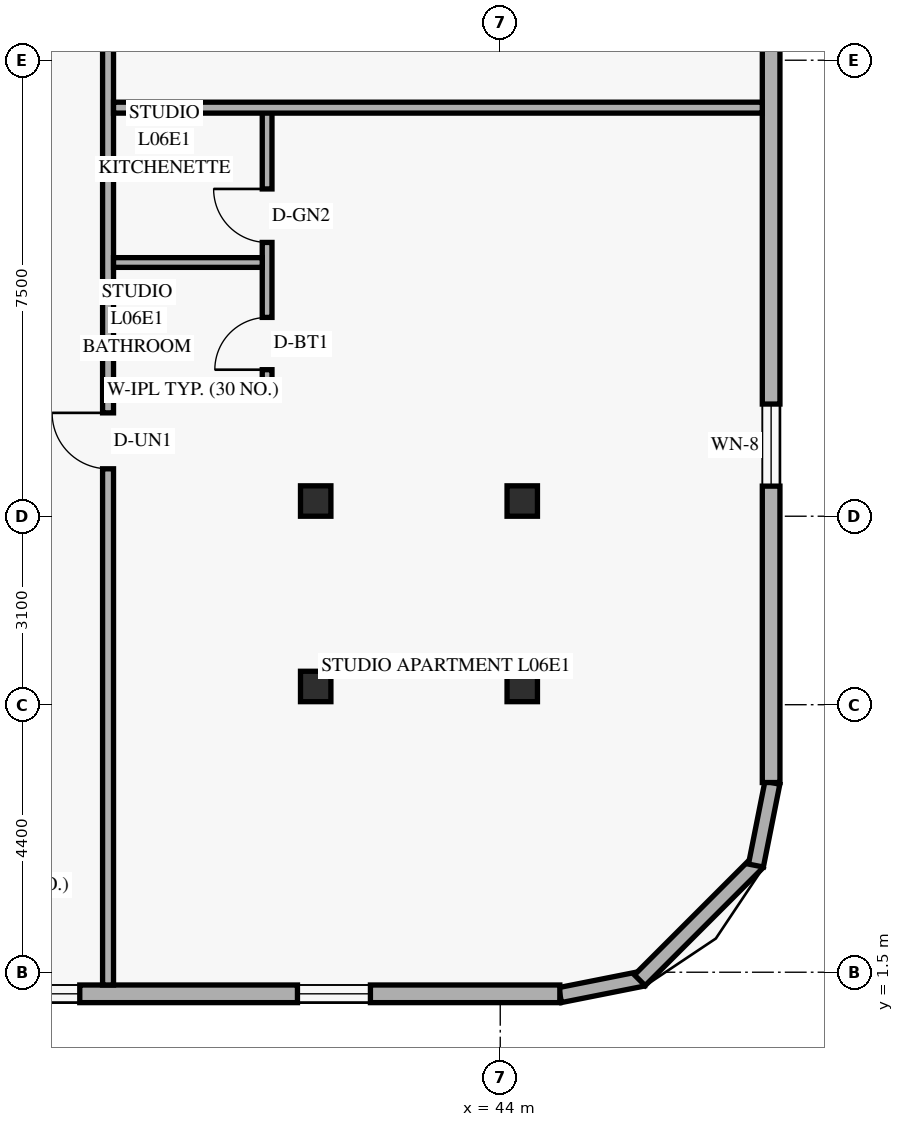
"""IFC4 building model, lengths in metres.
Left out: names, types, materials, properties, quantities, classifications, styles, units other than length and angle.
Written with IfcOpenShell. Run it as: python <this file> out.ifc"""

import sys

from ifc_helpers import new_model, si_unit, direction, frame, frame_2d, origin, origin_2d, place, context, subcontext, project, spatial, rectangle, hollow_rectangle, extrude, element, fill, save


model = new_model("IFC4")
c1 = context("Model", 3, precision=1e-05, world=origin(), true_north=direction((0.0, 1.0)))
c2 = subcontext(c1, "Body", "Model", "MODEL_VIEW")
j1 = project(units=[si_unit("LENGTHUNIT", "METRE"), si_unit("PLANEANGLEUNIT", "RADIAN")], contexts=[c1])
p1 = place(None, origin())
s1 = spatial("IfcSite", under=j1, at=p1, CompositionType="ELEMENT")
p2 = place(p1, origin())
s2 = spatial("IfcBuilding", under=s1, at=p2, CompositionType="ELEMENT")
p3 = place(p2, frame((0.0, 0.0, 27.6)))
s3 = spatial("IfcBuildingStorey", under=s2, at=p3, CompositionType="ELEMENT", Elevation=27.6)
for number, where, z_axis, x_axis in (
    (1, (40.902, 6.2, 0.0), (0.035, 0.0, 0.999), (0.0, 1.0, 0.0)),
    (2, (40.902, 9.25, 0.0), (0.035, 0.0, 0.999), (0.0, 1.0, 0.0)),
):
    element("IfcColumn", number, at=place(p3, frame(where, z_axis=z_axis, x_axis=x_axis)), inside=s3, PredefinedType="COLUMN", context=c2, shape_type="SweptSolid", body=[
        extrude(hollow_rectangle(XDim=0.5, YDim=0.5, WallThickness=0.022, at=origin_2d()), origin(), (0.0, 0.0, 1.0), 3.602),
    ])
for number, where, z_axis, x_axis in (
    (3, (44.258, 6.2, 0.0), (0.058, 0.0, 0.998), (0.0, 1.0, 0.0)),
    (4, (44.258, 9.25, 0.0), (0.058, 0.0, 0.998), (0.0, 1.0, 0.0)),
):
    element("IfcColumn", number, at=place(p3, frame(where, z_axis=z_axis, x_axis=x_axis)), inside=s3, PredefinedType="COLUMN", context=c2, shape_type="SweptSolid", body=[
        extrude(hollow_rectangle(XDim=0.5, YDim=0.5, WallThickness=0.022, at=origin_2d()), origin(), (0.0, 0.0, 1.0), 3.606),
    ])
p4 = place(p3, frame((44.983, 1.124, 0.0), z_axis=(0.0, 0.0, 1.0), x_axis=(0.980809899341, 0.19496651342, 0.0)))
e5 = element("IfcWall", 5, at=p4, inside=s3, PredefinedType="SOLIDWALL", context=c2, shape_type="SweptSolid", body=[
    extrude(rectangle(XDim=1.389, YDim=0.25, at=frame_2d((0.694, 0.0))), origin(), (0.0, 0.0, 1.0), 3.36),
])
p5 = place(p3, frame((46.295, 1.368, 0.0), z_axis=(0.0, 0.0, 1.0), x_axis=(0.707106781187, 0.707106781187, 0.0)))
e6 = element("IfcWall", 6, at=p5, inside=s3, PredefinedType="SOLIDWALL", context=c2, shape_type="SweptSolid", body=[
    extrude(rectangle(XDim=2.739, YDim=0.25, at=frame_2d((1.37, 0.0))), origin(), (0.0, 0.0, 1.0), 3.36),
])
p6 = place(p3, frame((48.205, 3.254, 0.0), z_axis=(0.0, 0.0, 1.0), x_axis=(0.19496651342, 0.980809899341, 0.0)))
e7 = element("IfcWall", 7, at=p6, inside=s3, PredefinedType="SOLIDWALL", context=c2, shape_type="SweptSolid", body=[
    extrude(rectangle(XDim=1.389, YDim=0.25, at=frame_2d((0.694, 0.0))), origin(), (0.0, 0.0, 1.0), 3.36),
])
p7 = place(p3, frame((5.42, 1.145, 0.0), z_axis=(0.0, 0.0, 1.0), x_axis=(1.0, 0.0, 0.0)))
e8 = element("IfcWall", 8, at=p7, inside=s3, PredefinedType="SOLIDWALL", context=c2, shape_type="SweptSolid", body=[
    extrude(rectangle(XDim=39.56, YDim=0.29, at=frame_2d((19.78, 0.0))), origin(), (0.0, 0.0, 1.0), 3.36),
])
p8 = place(p7, frame((2.84, 0.0, 0.85)))
e9 = element("IfcOpeningElement", 9, at=p8, cuts=e8, PredefinedType="OPENING", context=c2, shape_type="SweptSolid", body=[
    extrude(rectangle(XDim=1.2, YDim=1.5, at=frame_2d((0.6, 0.75))), frame((0.0, 0.155, 0.0), z_axis=(0.0, -1.0, 0.0), x_axis=(1.0, 0.0, 0.0)), (0.0, 0.0, 1.0), 0.31),
])
p9 = place(p7, frame((7.18, 0.0, 0.85)))
e10 = element("IfcOpeningElement", 10, at=p9, cuts=e8, PredefinedType="OPENING", context=c2, shape_type="SweptSolid", body=[
    extrude(rectangle(XDim=1.2, YDim=1.5, at=frame_2d((0.6, 0.75))), frame((0.0, 0.155, 0.0), z_axis=(0.0, -1.0, 0.0), x_axis=(1.0, 0.0, 0.0)), (0.0, 0.0, 1.0), 0.31),
])
p10 = place(p7, frame((11.245, 0.0, 0.85)))
e11 = element("IfcOpeningElement", 11, at=p10, cuts=e8, PredefinedType="OPENING", context=c2, shape_type="SweptSolid", body=[
    extrude(rectangle(XDim=1.2, YDim=1.5, at=frame_2d((0.6, 0.75))), frame((0.0, 0.155, 0.0), z_axis=(0.0, -1.0, 0.0), x_axis=(1.0, 0.0, 0.0)), (0.0, 0.0, 1.0), 0.31),
])
p11 = place(p7, frame((16.48, 0.0, 0.85)))
e12 = element("IfcOpeningElement", 12, at=p11, cuts=e8, PredefinedType="OPENING", context=c2, shape_type="SweptSolid", body=[
    extrude(rectangle(XDim=1.2, YDim=1.5, at=frame_2d((0.6, 0.75))), frame((0.0, 0.155, 0.0), z_axis=(0.0, -1.0, 0.0), x_axis=(1.0, 0.0, 0.0)), (0.0, 0.0, 1.0), 0.31),
])
p12 = place(p7, frame((21.905, 0.0, 0.85)))
e13 = element("IfcOpeningElement", 13, at=p12, cuts=e8, PredefinedType="OPENING", context=c2, shape_type="SweptSolid", body=[
    extrude(rectangle(XDim=1.2, YDim=1.5, at=frame_2d((0.6, 0.75))), frame((0.0, 0.155, 0.0), z_axis=(0.0, -1.0, 0.0), x_axis=(1.0, 0.0, 0.0)), (0.0, 0.0, 1.0), 0.31),
])
p13 = place(p7, frame((27.33, 0.0, 0.85)))
e14 = element("IfcOpeningElement", 14, at=p13, cuts=e8, PredefinedType="OPENING", context=c2, shape_type="SweptSolid", body=[
    extrude(rectangle(XDim=1.2, YDim=1.5, at=frame_2d((0.6, 0.75))), frame((0.0, 0.155, 0.0), z_axis=(0.0, -1.0, 0.0), x_axis=(1.0, 0.0, 0.0)), (0.0, 0.0, 1.0), 0.31),
])
p14 = place(p7, frame((30.465, 0.0, 0.85)))
e15 = element("IfcOpeningElement", 15, at=p14, cuts=e8, PredefinedType="OPENING", context=c2, shape_type="SweptSolid", body=[
    extrude(rectangle(XDim=1.2, YDim=1.5, at=frame_2d((0.6, 0.75))), frame((0.0, 0.155, 0.0), z_axis=(0.0, -1.0, 0.0), x_axis=(1.0, 0.0, 0.0)), (0.0, 0.0, 1.0), 0.31),
])
p15 = place(p7, frame((35.245, 0.0, 0.85)))
e16 = element("IfcOpeningElement", 16, at=p15, cuts=e8, PredefinedType="OPENING", context=c2, shape_type="SweptSolid", body=[
    extrude(rectangle(XDim=1.2, YDim=1.5, at=frame_2d((0.6, 0.75))), frame((0.0, 0.155, 0.0), z_axis=(0.0, -1.0, 0.0), x_axis=(1.0, 0.0, 0.0)), (0.0, 0.0, 1.0), 0.31),
])
p16 = place(p3, frame((48.455, 4.62, 0.0), z_axis=(0.0, 0.0, 1.0), x_axis=(0.0, 1.0, 0.0)))
e17 = element("IfcWall", 17, at=p16, inside=s3, PredefinedType="SOLIDWALL", context=c2, shape_type="SweptSolid", body=[
    extrude(rectangle(XDim=38.76, YDim=0.29, at=frame_2d((19.38, 0.0))), origin(), (0.0, 0.0, 1.0), 3.36),
])
p17 = place(p16, frame((4.875, 0.0, 0.85)))
e18 = element("IfcOpeningElement", 18, at=p17, cuts=e17, PredefinedType="OPENING", context=c2, shape_type="SweptSolid", body=[
    extrude(rectangle(XDim=1.35, YDim=1.55, at=frame_2d((0.675, 0.775))), frame((0.0, 0.155, 0.0), z_axis=(0.0, -1.0, 0.0), x_axis=(1.0, 0.0, 0.0)), (0.0, 0.0, 1.0), 0.31),
])
p18 = place(p16, frame((12.579, 0.0, 0.85)))
e19 = element("IfcOpeningElement", 19, at=p18, cuts=e17, PredefinedType="OPENING", context=c2, shape_type="SweptSolid", body=[
    extrude(rectangle(XDim=1.35, YDim=1.55, at=frame_2d((0.675, 0.775))), frame((0.0, 0.155, 0.0), z_axis=(0.0, -1.0, 0.0), x_axis=(1.0, 0.0, 0.0)), (0.0, 0.0, 1.0), 0.31),
])
p19 = place(p16, frame((18.404, 0.0, 0.85)))
e20 = element("IfcOpeningElement", 20, at=p19, cuts=e17, PredefinedType="OPENING", context=c2, shape_type="SweptSolid", body=[
    extrude(rectangle(XDim=1.35, YDim=1.55, at=frame_2d((0.675, 0.775))), frame((0.0, 0.155, 0.0), z_axis=(0.0, -1.0, 0.0), x_axis=(1.0, 0.0, 0.0)), (0.0, 0.0, 1.0), 0.31),
])
p20 = place(p16, frame((24.07, 0.0, 0.85)))
e21 = element("IfcOpeningElement", 21, at=p20, cuts=e17, PredefinedType="OPENING", context=c2, shape_type="SweptSolid", body=[
    extrude(rectangle(XDim=1.35, YDim=1.55, at=frame_2d((0.675, 0.775))), frame((0.0, 0.155, 0.0), z_axis=(0.0, -1.0, 0.0), x_axis=(1.0, 0.0, 0.0)), (0.0, 0.0, 1.0), 0.31),
])
p21 = place(p16, frame((32.075, 0.0, 0.85)))
e22 = element("IfcOpeningElement", 22, at=p21, cuts=e17, PredefinedType="OPENING", context=c2, shape_type="SweptSolid", body=[
    extrude(rectangle(XDim=1.35, YDim=1.55, at=frame_2d((0.675, 0.775))), frame((0.0, 0.155, 0.0), z_axis=(0.0, -1.0, 0.0), x_axis=(1.0, 0.0, 0.0)), (0.0, 0.0, 1.0), 0.31),
])
p22 = place(p3, frame((37.55, 1.29, 0.0), z_axis=(0.0, 0.0, 1.0), x_axis=(0.0, 1.0, 0.0)))
e23 = element("IfcWall", 23, at=p22, inside=s3, PredefinedType="STANDARD", context=c2, shape_type="SweptSolid", body=[
    extrude(rectangle(XDim=45.42, YDim=0.18, at=frame_2d((22.71, 0.0))), origin(), (0.0, 0.0, 1.0), 2.649),
])
p23 = place(p22, frame((8.49, 0.0, 0.0)))
e24 = element("IfcOpeningElement", 24, at=p23, cuts=e23, PredefinedType="OPENING", context=c2, shape_type="SweptSolid", body=[
    extrude(rectangle(XDim=0.92, YDim=2.15, at=frame_2d((0.46, 1.075))), frame((0.0, 0.1, 0.0), z_axis=(0.0, -1.0, 0.0), x_axis=(1.0, 0.0, 0.0)), (0.0, 0.0, 1.0), 0.2),
])
p24 = place(p22, frame((20.073, 0.0, 0.0)))
e25 = element("IfcOpeningElement", 25, at=p24, cuts=e23, PredefinedType="OPENING", context=c2, shape_type="SweptSolid", body=[
    extrude(rectangle(XDim=0.92, YDim=2.15, at=frame_2d((0.46, 1.075))), frame((0.0, 0.1, 0.0), z_axis=(0.0, -1.0, 0.0), x_axis=(1.0, 0.0, 0.0)), (0.0, 0.0, 1.0), 0.2),
])
p25 = place(p22, frame((35.256, 0.0, 0.0)))
e26 = element("IfcOpeningElement", 26, at=p25, cuts=e23, PredefinedType="OPENING", context=c2, shape_type="SweptSolid", body=[
    extrude(rectangle(XDim=0.92, YDim=2.15, at=frame_2d((0.46, 1.075))), frame((0.0, 0.1, 0.0), z_axis=(0.0, -1.0, 0.0), x_axis=(1.0, 0.0, 0.0)), (0.0, 0.0, 1.0), 0.2),
])
p26 = place(p3, frame((37.64, 11.08, 0.0), z_axis=(0.0, 0.0, 1.0), x_axis=(1.0, 0.0, 0.0)))
e27 = element("IfcWall", 27, at=p26, inside=s3, PredefinedType="PLUMBINGWALL", context=c2, shape_type="SweptSolid", body=[
    extrude(rectangle(XDim=2.606, YDim=0.16, at=frame_2d((1.303, 0.0))), origin(), (0.0, 0.0, 1.0), 3.36),
])
p27 = place(p3, frame((40.166, 10.99, 0.0), z_axis=(0.0, 0.0, 1.0), x_axis=(0.0, 1.0, 0.0)))
e28 = element("IfcWall", 28, at=p27, inside=s3, PredefinedType="PLUMBINGWALL", context=c2, shape_type="SweptSolid", body=[
    extrude(rectangle(XDim=4.73, YDim=0.16, at=frame_2d((2.365, 0.0))), origin(), (0.0, 0.0, 1.0), 2.932),
])
p28 = place(p27, frame((0.42, 0.0, 0.0)))
e29 = element("IfcOpeningElement", 29, at=p28, cuts=e28, PredefinedType="OPENING", context=c2, shape_type="SweptSolid", body=[
    extrude(rectangle(XDim=0.86, YDim=2.12, at=frame_2d((0.43, 1.06))), frame((0.0, 0.09, 0.0), z_axis=(0.0, -1.0, 0.0), x_axis=(1.0, 0.0, 0.0)), (0.0, 0.0, 1.0), 0.18),
])
p29 = place(p27, frame((2.513, 0.0, 0.0)))
e30 = element("IfcOpeningElement", 30, at=p29, cuts=e28, PredefinedType="OPENING", context=c2, shape_type="SweptSolid", body=[
    extrude(rectangle(XDim=0.88, YDim=2.12, at=frame_2d((0.44, 1.06))), frame((0.0, 0.09, 0.0), z_axis=(0.0, -1.0, 0.0), x_axis=(1.0, 0.0, 0.0)), (0.0, 0.0, 1.0), 0.18),
])
p30 = place(p3, frame((37.64, 13.173, 0.0), z_axis=(0.0, 0.0, 1.0), x_axis=(1.0, 0.0, 0.0)))
e31 = element("IfcWall", 31, at=p30, inside=s3, PredefinedType="PLUMBINGWALL", context=c2, shape_type="SweptSolid", body=[
    extrude(rectangle(XDim=2.446, YDim=0.16, at=frame_2d((1.223, 0.0))), origin(), (0.0, 0.0, 1.0), 3.36),
])
p31 = place(p3, frame((37.64, 15.72, 0.0), z_axis=(0.0, 0.0, 1.0), x_axis=(1.0, 0.0, 0.0)))
e32 = element("IfcWall", 32, at=p31, inside=s3, PredefinedType="PARTITIONING", context=c2, shape_type="SweptSolid", body=[
    extrude(rectangle(XDim=10.67, YDim=0.18, at=frame_2d((5.335, 0.0))), origin(), (0.0, 0.0, 1.0), 2.649),
])
p32 = place(p14, origin())
e33 = element("IfcWindow", 33, at=p32, inside=s3, PartitioningType="SINGLE_PANEL", PredefinedType="WINDOW", context=c2, shape_type="SweptSolid", body=[
    extrude(rectangle(XDim=1.2, YDim=1.5, at=frame_2d((0.6, 0.75))), frame((0.0, 0.03, 0.0), z_axis=(0.0, -1.0, 0.0), x_axis=(1.0, 0.0, 0.0)), (0.0, 0.0, 1.0), 0.06),
])
fill(e15, e33)
p33 = place(p15, origin())
e34 = element("IfcWindow", 34, at=p33, inside=s3, PartitioningType="SINGLE_PANEL", PredefinedType="WINDOW", context=c2, shape_type="SweptSolid", body=[
    extrude(rectangle(XDim=1.2, YDim=1.5, at=frame_2d((0.6, 0.75))), frame((0.0, 0.03, 0.0), z_axis=(0.0, -1.0, 0.0), x_axis=(1.0, 0.0, 0.0)), (0.0, 0.0, 1.0), 0.06),
])
fill(e16, e34)
p34 = place(p17, origin())
e35 = element("IfcWindow", 35, at=p34, inside=s3, PartitioningType="SINGLE_PANEL", PredefinedType="WINDOW", context=c2, shape_type="SweptSolid", body=[
    extrude(rectangle(XDim=1.35, YDim=1.55, at=frame_2d((0.675, 0.775))), frame((0.0, 0.03, 0.0), z_axis=(0.0, -1.0, 0.0), x_axis=(1.0, 0.0, 0.0)), (0.0, 0.0, 1.0), 0.06),
])
fill(e18, e35)
p35 = place(p23, origin())
e36 = element("IfcDoor", 36, at=p35, inside=s3, OperationType="SINGLE_SWING_RIGHT", PredefinedType="DOOR", context=c2, shape_type="SweptSolid", body=[
    extrude(rectangle(XDim=0.92, YDim=2.15, at=frame_2d((0.46, 1.075))), frame((0.0, 0.025, 0.0), z_axis=(0.0, -1.0, 0.0), x_axis=(1.0, 0.0, 0.0)), (0.0, 0.0, 1.0), 0.05),
])
fill(e24, e36)
p36 = place(p28, origin())
e37 = element("IfcDoor", 37, at=p36, inside=s3, OperationType="SINGLE_SWING_LEFT", PredefinedType="DOOR", context=c2, shape_type="SweptSolid", body=[
    extrude(rectangle(XDim=0.86, YDim=2.12, at=frame_2d((0.43, 1.06))), frame((0.0, 0.025, 0.0), z_axis=(0.0, -1.0, 0.0), x_axis=(1.0, 0.0, 0.0)), (0.0, 0.0, 1.0), 0.05),
])
fill(e29, e37)
p37 = place(p29, origin())
e38 = element("IfcDoor", 38, at=p37, inside=s3, OperationType="SINGLE_SWING_RIGHT", PredefinedType="DOOR", context=c2, shape_type="SweptSolid", body=[
    extrude(rectangle(XDim=0.88, YDim=2.12, at=frame_2d((0.44, 1.06))), frame((0.0, 0.025, 0.0), z_axis=(0.0, -1.0, 0.0), x_axis=(1.0, 0.0, 0.0)), (0.0, 0.0, 1.0), 0.05),
])
fill(e30, e38)
save(model, sys.argv[1])
